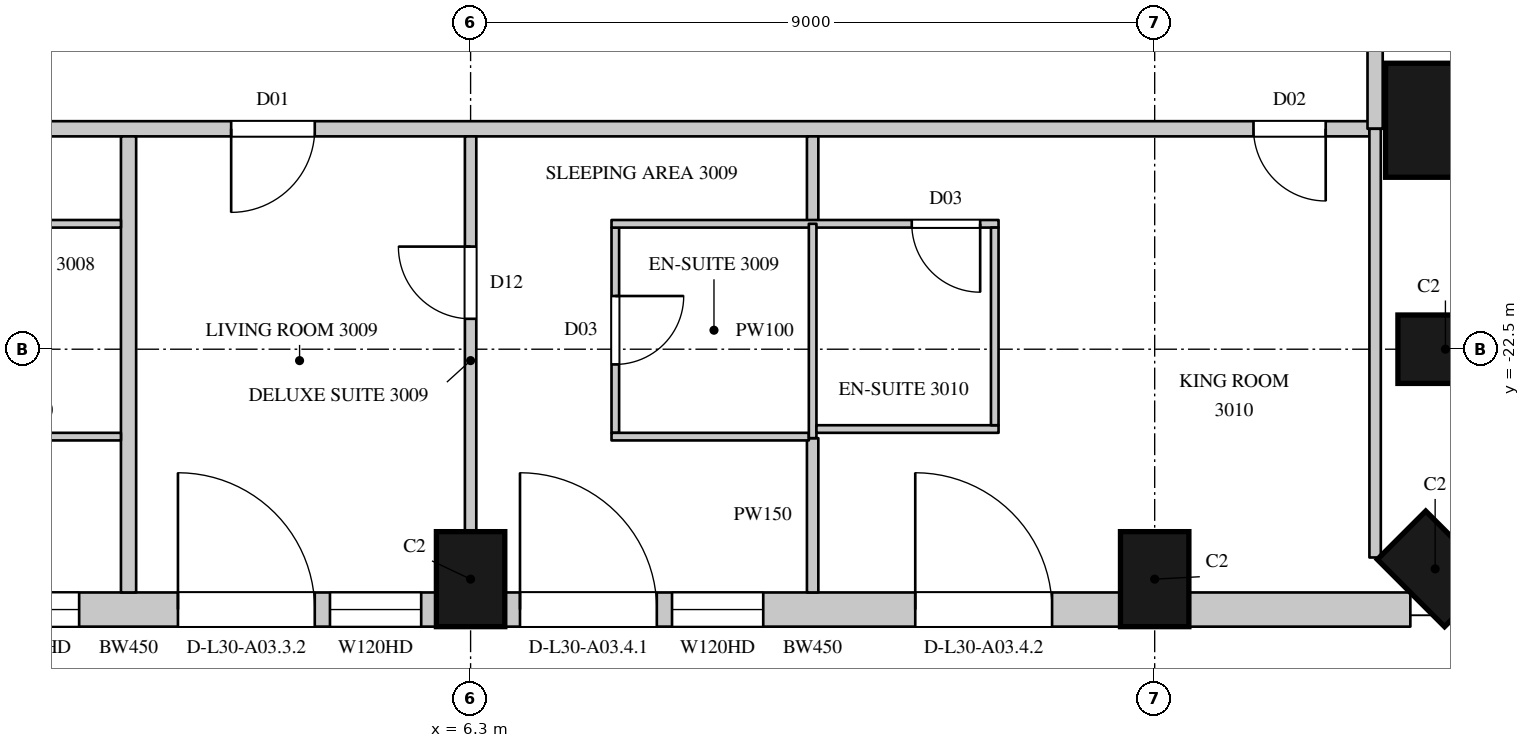
"""IFC4 building model, lengths in metres.
Left out: names, types, materials, properties, quantities, classifications, styles, units other than length and angle.
Written with IfcOpenShell. Run it as: python <this file> out.ifc"""

import sys

from ifc_helpers import new_model, si_unit, direction, frame, frame_2d, origin, origin_2d, place, context, subcontext, project, spatial, rectangle, circle, extrude, element, fill, save


model = new_model("IFC4")
c1 = context("Model", 3, precision=1e-05, world=origin(), true_north=direction((0.0, 1.0)))
c2 = subcontext(c1, "Body", "Model", "MODEL_VIEW")
j1 = project(units=[si_unit("LENGTHUNIT", "METRE"), si_unit("PLANEANGLEUNIT", "RADIAN")], contexts=[c1])
p1 = place(None, origin())
s1 = spatial("IfcSite", under=j1, at=p1, CompositionType="ELEMENT")
p2 = place(p1, origin())
s2 = spatial("IfcBuilding", under=s1, at=p2, CompositionType="ELEMENT")
p3 = place(p2, frame((0.0, 0.0, 138.3)))
s3 = spatial("IfcBuildingStorey", under=s2, at=p3, CompositionType="ELEMENT", Elevation=138.3)
for number, where, z_axis, x_axis in (
    (1, (6.3, -25.525, 0.0), (0.0, 0.0, 1.0), (1.0, 0.0, 0.0)),
    (2, (15.3, -25.525, 0.0), (0.0, 0.0, 1.0), (1.0, 0.0, 0.0)),
    (3, (18.99, -25.39, 0.0), (0.0, 0.0, 1.0), (0.707, 0.707, 0.0)),
    (4, (19.125, -22.5, 0.0), (0.0, 0.0, 1.0), (0.0, 1.0, 0.0)),
):
    element("IfcColumn", number, at=place(p3, frame(where, z_axis=z_axis, x_axis=x_axis)), inside=s3, PredefinedType="COLUMN", context=c2, shape_type="SweptSolid", body=[
        extrude(rectangle(XDim=0.9, YDim=1.25, at=origin_2d()), origin(), (0.0, 0.0, 1.0), 3.6),
    ])
p4 = place(p3, frame((19.088, -19.488, 0.0), z_axis=(0.0, 0.0, 1.0), x_axis=(1.0, 0.0, 0.0)))
e5 = element("IfcColumn", 5, at=p4, inside=s3, PredefinedType="COLUMN", context=c2, shape_type="SweptSolid", body=[
    extrude(circle(Radius=0.75, at=origin_2d()), origin(), (0.0, 0.0, 1.0), 3.6),
])
p5 = place(p3, frame((-2.25, -25.925, 0.0), z_axis=(0.0, 0.0, 1.0), x_axis=(1.0, 0.0, 0.0)))
e6 = element("IfcWall", 6, at=p5, inside=s3, PredefinedType="SOLIDWALL", context=c2, shape_type="SweptSolid", body=[
    extrude(rectangle(XDim=8.1, YDim=0.45, at=frame_2d((4.05, 0.0))), origin(), (0.0, 0.0, 1.0), 3.3),
])
p6 = place(p5, frame((0.2, 0.0, 0.0)))
e7 = element("IfcOpeningElement", 7, at=p6, cuts=e6, PredefinedType="OPENING", context=c2, shape_type="SweptSolid", body=[
    extrude(rectangle(XDim=1.8, YDim=2.4, at=frame_2d((0.9, 1.2))), frame((0.0, 0.235, 0.0), z_axis=(0.0, -1.0, 0.0), x_axis=(1.0, 0.0, 0.0)), (0.0, 0.0, 1.0), 0.47),
])
p7 = place(p5, frame((2.2, 0.0, 1.05)))
e8 = element("IfcOpeningElement", 8, at=p7, cuts=e6, PredefinedType="OPENING", context=c2, shape_type="SweptSolid", body=[
    extrude(rectangle(XDim=1.2, YDim=2.0, at=frame_2d((0.6, 1.0))), frame((0.0, 0.235, 0.0), z_axis=(0.0, -1.0, 0.0), x_axis=(1.0, 0.0, 0.0)), (0.0, 0.0, 1.0), 0.47),
])
p8 = place(p5, frame((4.7, 0.0, 0.0)))
e9 = element("IfcOpeningElement", 9, at=p8, cuts=e6, PredefinedType="OPENING", context=c2, shape_type="SweptSolid", body=[
    extrude(rectangle(XDim=1.8, YDim=2.4, at=frame_2d((0.9, 1.2))), frame((0.0, 0.235, 0.0), z_axis=(0.0, -1.0, 0.0), x_axis=(1.0, 0.0, 0.0)), (0.0, 0.0, 1.0), 0.47),
])
p9 = place(p5, frame((6.7, 0.0, 1.05)))
e10 = element("IfcOpeningElement", 10, at=p9, cuts=e6, PredefinedType="OPENING", context=c2, shape_type="SweptSolid", body=[
    extrude(rectangle(XDim=1.2, YDim=2.0, at=frame_2d((0.6, 1.0))), frame((0.0, 0.235, 0.0), z_axis=(0.0, -1.0, 0.0), x_axis=(1.0, 0.0, 0.0)), (0.0, 0.0, 1.0), 0.47),
])
p10 = place(p3, frame((6.75, -25.925, 0.0), z_axis=(0.0, 0.0, 1.0), x_axis=(1.0, 0.0, 0.0)))
e11 = element("IfcWall", 11, at=p10, inside=s3, PredefinedType="SOLIDWALL", context=c2, shape_type="SweptSolid", body=[
    extrude(rectangle(XDim=8.1, YDim=0.45, at=frame_2d((4.05, 0.0))), origin(), (0.0, 0.0, 1.0), 3.3),
])
p11 = place(p10, frame((0.2, 0.0, 0.0)))
e12 = element("IfcOpeningElement", 12, at=p11, cuts=e11, PredefinedType="OPENING", context=c2, shape_type="SweptSolid", body=[
    extrude(rectangle(XDim=1.8, YDim=2.4, at=frame_2d((0.9, 1.2))), frame((0.0, 0.235, 0.0), z_axis=(0.0, -1.0, 0.0), x_axis=(1.0, 0.0, 0.0)), (0.0, 0.0, 1.0), 0.47),
])
p12 = place(p10, frame((2.2, 0.0, 1.05)))
e13 = element("IfcOpeningElement", 13, at=p12, cuts=e11, PredefinedType="OPENING", context=c2, shape_type="SweptSolid", body=[
    extrude(rectangle(XDim=1.2, YDim=2.0, at=frame_2d((0.6, 1.0))), frame((0.0, 0.235, 0.0), z_axis=(0.0, -1.0, 0.0), x_axis=(1.0, 0.0, 0.0)), (0.0, 0.0, 1.0), 0.47),
])
p13 = place(p10, frame((5.4, 0.0, 0.0)))
e14 = element("IfcOpeningElement", 14, at=p13, cuts=e11, PredefinedType="OPENING", context=c2, shape_type="SweptSolid", body=[
    extrude(rectangle(XDim=1.8, YDim=2.4, at=frame_2d((0.9, 1.2))), frame((0.0, 0.235, 0.0), z_axis=(0.0, -1.0, 0.0), x_axis=(1.0, 0.0, 0.0)), (0.0, 0.0, 1.0), 0.47),
])
p14 = place(p3, frame((15.75, -25.925, 0.0), z_axis=(0.0, 0.0, 1.0), x_axis=(1.0, 0.0, 0.0)))
e15 = element("IfcWall", 15, at=p14, inside=s3, PredefinedType="SOLIDWALL", context=c2, shape_type="SweptSolid", body=[
    extrude(rectangle(XDim=2.914, YDim=0.45, at=frame_2d((1.457, 0.0))), origin(), (0.0, 0.0, 1.0), 3.3),
])
p15 = place(p3, frame((-20.7, -19.6, 0.0), z_axis=(0.0, 0.0, 1.0), x_axis=(1.0, 0.0, 0.0)))
e16 = element("IfcWall", 16, at=p15, inside=s3, PredefinedType="PARTITIONING", context=c2, shape_type="SweptSolid", body=[
    extrude(rectangle(XDim=38.825, YDim=0.2, at=frame_2d((19.413, 0.0))), origin(), (0.0, 0.0, 1.0), 3.3),
])
p16 = place(p15, frame((3.15, 0.0, 0.0)))
e17 = element("IfcOpeningElement", 17, at=p16, cuts=e16, PredefinedType="OPENING", context=c2, shape_type="SweptSolid", body=[
    extrude(rectangle(XDim=1.1, YDim=2.4, at=frame_2d((0.55, 1.2))), frame((0.0, 0.11, 0.0), z_axis=(0.0, -1.0, 0.0), x_axis=(1.0, 0.0, 0.0)), (0.0, 0.0, 1.0), 0.22),
])
p17 = place(p15, frame((14.85, 0.0, 0.0)))
e18 = element("IfcOpeningElement", 18, at=p17, cuts=e16, PredefinedType="OPENING", context=c2, shape_type="SweptSolid", body=[
    extrude(rectangle(XDim=1.1, YDim=2.4, at=frame_2d((0.55, 1.2))), frame((0.0, 0.11, 0.0), z_axis=(0.0, -1.0, 0.0), x_axis=(1.0, 0.0, 0.0)), (0.0, 0.0, 1.0), 0.22),
])
p18 = place(p15, frame((23.85, 0.0, 0.0)))
e19 = element("IfcOpeningElement", 19, at=p18, cuts=e16, PredefinedType="OPENING", context=c2, shape_type="SweptSolid", body=[
    extrude(rectangle(XDim=1.1, YDim=2.4, at=frame_2d((0.55, 1.2))), frame((0.0, 0.11, 0.0), z_axis=(0.0, -1.0, 0.0), x_axis=(1.0, 0.0, 0.0)), (0.0, 0.0, 1.0), 0.22),
])
p19 = place(p15, frame((37.3, 0.0, 0.0)))
e20 = element("IfcOpeningElement", 20, at=p19, cuts=e16, PredefinedType="OPENING", context=c2, shape_type="SweptSolid", body=[
    extrude(rectangle(XDim=0.95, YDim=2.2, at=frame_2d((0.475, 1.1))), frame((0.0, 0.11, 0.0), z_axis=(0.0, -1.0, 0.0), x_axis=(1.0, 0.0, 0.0)), (0.0, 0.0, 1.0), 0.22),
])
p20 = place(p3, frame((18.2, -19.6, 0.0), z_axis=(0.0, 0.0, 1.0), x_axis=(0.0, 1.0, 0.0)))
e21 = element("IfcWall", 21, at=p20, inside=s3, PredefinedType="PARTITIONING", context=c2, shape_type="SweptSolid", body=[
    extrude(rectangle(XDim=14.85, YDim=0.2, at=frame_2d((7.425, 0.0))), origin(), (0.0, 0.0, 1.0), 3.3),
])
p21 = place(p20, frame((3.9, 0.0, 0.0)))
e22 = element("IfcOpeningElement", 22, at=p21, cuts=e21, PredefinedType="OPENING", context=c2, shape_type="SweptSolid", body=[
    extrude(rectangle(XDim=0.95, YDim=2.2, at=frame_2d((0.475, 1.1))), frame((0.0, 0.11, 0.0), z_axis=(0.0, -1.0, 0.0), x_axis=(1.0, 0.0, 0.0)), (0.0, 0.0, 1.0), 0.22),
])
p22 = place(p20, frame((13.5, 0.0, 0.0)))
e23 = element("IfcOpeningElement", 23, at=p22, cuts=e21, PredefinedType="OPENING", context=c2, shape_type="SweptSolid", body=[
    extrude(rectangle(XDim=0.95, YDim=2.2, at=frame_2d((0.475, 1.1))), frame((0.0, 0.11, 0.0), z_axis=(0.0, -1.0, 0.0), x_axis=(1.0, 0.0, 0.0)), (0.0, 0.0, 1.0), 0.22),
])
p23 = place(p3, frame((6.3, -24.9, 0.0), z_axis=(0.0, 0.0, 1.0), x_axis=(0.0, 1.0, 0.0)))
e24 = element("IfcWall", 24, at=p23, inside=s3, PredefinedType="PARTITIONING", context=c2, shape_type="SweptSolid", body=[
    extrude(rectangle(XDim=5.2, YDim=0.15, at=frame_2d((2.6, 0.0))), origin(), (0.0, 0.0, 1.0), 2.75),
])
p24 = place(p23, frame((2.8, 0.0, 0.0)))
e25 = element("IfcOpeningElement", 25, at=p24, cuts=e24, PredefinedType="OPENING", context=c2, shape_type="SweptSolid", body=[
    extrude(rectangle(XDim=0.95, YDim=2.2, at=frame_2d((0.475, 1.1))), frame((0.0, 0.085, 0.0), z_axis=(0.0, -1.0, 0.0), x_axis=(1.0, 0.0, 0.0)), (0.0, 0.0, 1.0), 0.17),
])
p25 = place(p3, frame((10.8, -25.7, 0.0), z_axis=(0.0, 0.0, 1.0), x_axis=(0.0, 1.0, 0.0)))
e26 = element("IfcWall", 26, at=p25, inside=s3, PredefinedType="PARTITIONING", context=c2, shape_type="SweptSolid", body=[
    extrude(rectangle(XDim=2.03, YDim=0.15, at=frame_2d((1.015, 0.0))), origin(), (0.0, 0.0, 1.0), 2.65),
])
p26 = place(p3, frame((10.8, -20.85, 0.0), z_axis=(0.0, 0.0, 1.0), x_axis=(0.0, 1.0, 0.0)))
e27 = element("IfcWall", 27, at=p26, inside=s3, PredefinedType="PARTITIONING", context=c2, shape_type="SweptSolid", body=[
    extrude(rectangle(XDim=1.15, YDim=0.15, at=frame_2d((0.575, 0.0))), origin(), (0.0, 0.0, 1.0), 2.65),
])
p27 = place(p3, frame((18.2, -25.24, 0.0), z_axis=(0.0, 0.0, 1.0), x_axis=(0.0, 1.0, 0.0)))
e28 = element("IfcWall", 28, at=p27, inside=s3, PredefinedType="PARTITIONING", context=c2, shape_type="SweptSolid", body=[
    extrude(rectangle(XDim=5.64, YDim=0.15, at=frame_2d((2.82, 0.0))), origin(), (0.0, 0.0, 1.0), 3.3),
])
p28 = place(p3, frame((1.8, -25.7, 0.0), z_axis=(0.0, 0.0, 1.0), x_axis=(0.0, 1.0, 0.0)))
e29 = element("IfcWall", 29, at=p28, inside=s3, PredefinedType="PARTITIONING", context=c2, shape_type="SweptSolid", body=[
    extrude(rectangle(XDim=6.0, YDim=0.2, at=frame_2d((3.0, 0.0))), origin(), (0.0, 0.0, 1.0), 2.65),
])
for number, where, z_axis, x_axis in (
    (30, (-0.846, -23.65, 0.0), (0.0, 0.0, 1.0), (1.0, 0.0, 0.0)),
    (31, (-0.846, -20.85, 0.0), (0.0, 0.0, 1.0), (1.0, 0.0, 0.0)),
):
    element("IfcWall", number, at=place(p3, frame(where, z_axis=z_axis, x_axis=x_axis)), inside=s3, PredefinedType="PARTITIONING", context=c2, shape_type="SweptSolid", body=[
        extrude(rectangle(XDim=2.546, YDim=0.1, at=frame_2d((1.273, 0.0))), origin(), (0.0, 0.0, 1.0), 3.3),
    ])
p29 = place(p3, frame((8.204, -23.6, 0.0), z_axis=(0.0, 0.0, 1.0), x_axis=(0.0, 1.0, 0.0)))
e32 = element("IfcWall", 32, at=p29, inside=s3, PredefinedType="PARTITIONING", context=c2, shape_type="SweptSolid", body=[
    extrude(rectangle(XDim=2.7, YDim=0.1, at=frame_2d((1.35, 0.0))), origin(), (0.0, 0.0, 1.0), 3.3),
])
p30 = place(p29, frame((0.9, 0.0, 0.0)))
e33 = element("IfcOpeningElement", 33, at=p30, cuts=e32, PredefinedType="OPENING", context=c2, shape_type="SweptSolid", body=[
    extrude(rectangle(XDim=0.9, YDim=2.2, at=frame_2d((0.45, 1.1))), frame((0.0, 0.06, 0.0), z_axis=(0.0, -1.0, 0.0), x_axis=(1.0, 0.0, 0.0)), (0.0, 0.0, 1.0), 0.12),
])
p31 = place(p3, frame((8.154, -23.65, 0.0), z_axis=(0.0, 0.0, 1.0), x_axis=(1.0, 0.0, 0.0)))
e34 = element("IfcWall", 34, at=p31, inside=s3, PredefinedType="PARTITIONING", context=c2, shape_type="SweptSolid", body=[
    extrude(rectangle(XDim=2.596, YDim=0.1, at=frame_2d((1.298, 0.0))), origin(), (0.0, 0.0, 1.0), 3.3),
])
p32 = place(p3, frame((8.154, -20.85, 0.0), z_axis=(0.0, 0.0, 1.0), x_axis=(1.0, 0.0, 0.0)))
e35 = element("IfcWall", 35, at=p32, inside=s3, PredefinedType="PARTITIONING", context=c2, shape_type="SweptSolid", body=[
    extrude(rectangle(XDim=5.092, YDim=0.1, at=frame_2d((2.546, 0.0))), origin(), (0.0, 0.0, 1.0), 3.3),
])
p33 = place(p32, frame((3.95, 0.0, 0.0)))
e36 = element("IfcOpeningElement", 36, at=p33, cuts=e35, PredefinedType="OPENING", context=c2, shape_type="SweptSolid", body=[
    extrude(rectangle(XDim=0.9, YDim=2.2, at=frame_2d((0.45, 1.1))), frame((0.0, 0.06, 0.0), z_axis=(0.0, -1.0, 0.0), x_axis=(1.0, 0.0, 0.0)), (0.0, 0.0, 1.0), 0.12),
])
p34 = place(p3, frame((10.8, -23.67, 0.0), z_axis=(0.0, 0.0, 1.0), x_axis=(0.0, 1.0, 0.0)))
e37 = element("IfcWall", 37, at=p34, inside=s3, PredefinedType="PARTITIONING", context=c2, shape_type="SweptSolid", body=[
    extrude(rectangle(XDim=2.82, YDim=0.1, at=frame_2d((1.41, 0.0))), origin(), (0.0, 0.0, 1.0), 2.65),
])
p35 = place(p3, frame((10.85, -23.55, 0.0), z_axis=(0.0, 0.0, 1.0), x_axis=(1.0, 0.0, 0.0)))
e38 = element("IfcWall", 38, at=p35, inside=s3, PredefinedType="PARTITIONING", context=c2, shape_type="SweptSolid", body=[
    extrude(rectangle(XDim=2.396, YDim=0.1, at=frame_2d((1.198, 0.0))), origin(), (0.0, 0.0, 1.0), 3.3),
])
p36 = place(p3, frame((13.196, -23.5, 0.0), z_axis=(0.0, 0.0, 1.0), x_axis=(0.0, 1.0, 0.0)))
e39 = element("IfcWall", 39, at=p36, inside=s3, PredefinedType="PARTITIONING", context=c2, shape_type="SweptSolid", body=[
    extrude(rectangle(XDim=2.6, YDim=0.1, at=frame_2d((1.3, 0.0))), origin(), (0.0, 0.0, 1.0), 3.3),
])
p37 = place(p7, origin())
e40 = element("IfcWindow", 40, at=p37, inside=s3, PartitioningType="SINGLE_PANEL", PredefinedType="WINDOW", context=c2, shape_type="SweptSolid", body=[
    extrude(rectangle(XDim=1.2, YDim=2.0, at=frame_2d((0.6, 1.0))), frame((0.0, 0.135, 0.0), z_axis=(0.0, -1.0, 0.0), x_axis=(1.0, 0.0, 0.0)), (0.0, 0.0, 1.0), 0.06),
])
fill(e8, e40)
p38 = place(p8, origin())
e41 = element("IfcDoor", 41, at=p38, inside=s3, OperationType="SLIDING_TO_LEFT", PredefinedType="DOOR", context=c2, shape_type="SweptSolid", body=[
    extrude(rectangle(XDim=1.8, YDim=2.4, at=frame_2d((0.9, 1.2))), frame((0.0, 0.13, 0.0), z_axis=(0.0, -1.0, 0.0), x_axis=(1.0, 0.0, 0.0)), (0.0, 0.0, 1.0), 0.05),
])
fill(e9, e41)
p39 = place(p9, origin())
e42 = element("IfcWindow", 42, at=p39, inside=s3, PartitioningType="SINGLE_PANEL", PredefinedType="WINDOW", context=c2, shape_type="SweptSolid", body=[
    extrude(rectangle(XDim=1.2, YDim=2.0, at=frame_2d((0.6, 1.0))), frame((0.0, 0.135, 0.0), z_axis=(0.0, -1.0, 0.0), x_axis=(1.0, 0.0, 0.0)), (0.0, 0.0, 1.0), 0.06),
])
fill(e10, e42)
p40 = place(p11, origin())
e43 = element("IfcDoor", 43, at=p40, inside=s3, OperationType="SLIDING_TO_LEFT", PredefinedType="DOOR", context=c2, shape_type="SweptSolid", body=[
    extrude(rectangle(XDim=1.8, YDim=2.4, at=frame_2d((0.9, 1.2))), frame((0.0, 0.13, 0.0), z_axis=(0.0, -1.0, 0.0), x_axis=(1.0, 0.0, 0.0)), (0.0, 0.0, 1.0), 0.05),
])
fill(e12, e43)
p41 = place(p12, origin())
e44 = element("IfcWindow", 44, at=p41, inside=s3, PartitioningType="SINGLE_PANEL", PredefinedType="WINDOW", context=c2, shape_type="SweptSolid", body=[
    extrude(rectangle(XDim=1.2, YDim=2.0, at=frame_2d((0.6, 1.0))), frame((0.0, 0.135, 0.0), z_axis=(0.0, -1.0, 0.0), x_axis=(1.0, 0.0, 0.0)), (0.0, 0.0, 1.0), 0.06),
])
fill(e13, e44)
p42 = place(p13, origin())
e45 = element("IfcDoor", 45, at=p42, inside=s3, OperationType="SLIDING_TO_LEFT", PredefinedType="DOOR", context=c2, shape_type="SweptSolid", body=[
    extrude(rectangle(XDim=1.8, YDim=2.4, at=frame_2d((0.9, 1.2))), frame((0.0, 0.13, 0.0), z_axis=(0.0, -1.0, 0.0), x_axis=(1.0, 0.0, 0.0)), (0.0, 0.0, 1.0), 0.05),
])
fill(e14, e45)
p43 = place(p18, origin())
e46 = element("IfcDoor", 46, at=p43, inside=s3, OperationType="SINGLE_SWING_RIGHT", PredefinedType="DOOR", context=c2, shape_type="SweptSolid", body=[
    extrude(rectangle(XDim=1.1, YDim=2.4, at=frame_2d((0.55, 1.2))), frame((0.0, 0.025, 0.0), z_axis=(0.0, -1.0, 0.0), x_axis=(1.0, 0.0, 0.0)), (0.0, 0.0, 1.0), 0.05),
])
fill(e19, e46)
p44 = place(p24, origin())
e47 = element("IfcDoor", 47, at=p44, inside=s3, OperationType="SINGLE_SWING_RIGHT", PredefinedType="DOOR", context=c2, shape_type="SweptSolid", body=[
    extrude(rectangle(XDim=0.95, YDim=2.2, at=frame_2d((0.475, 1.1))), frame((0.0, 0.025, 0.0), z_axis=(0.0, -1.0, 0.0), x_axis=(1.0, 0.0, 0.0)), (0.0, 0.0, 1.0), 0.05),
])
fill(e25, e47)
p45 = place(p30, origin())
e48 = element("IfcDoor", 48, at=p45, inside=s3, OperationType="SINGLE_SWING_LEFT", PredefinedType="DOOR", context=c2, shape_type="SweptSolid", body=[
    extrude(rectangle(XDim=0.9, YDim=2.2, at=frame_2d((0.45, 1.1))), frame((0.0, 0.025, 0.0), z_axis=(0.0, -1.0, 0.0), x_axis=(1.0, 0.0, 0.0)), (0.0, 0.0, 1.0), 0.05),
])
fill(e33, e48)
p46 = place(p19, origin())
e49 = element("IfcDoor", 49, at=p46, inside=s3, OperationType="SINGLE_SWING_LEFT", PredefinedType="DOOR", context=c2, shape_type="SweptSolid", body=[
    extrude(rectangle(XDim=0.95, YDim=2.2, at=frame_2d((0.475, 1.1))), frame((0.0, 0.025, 0.0), z_axis=(0.0, -1.0, 0.0), x_axis=(1.0, 0.0, 0.0)), (0.0, 0.0, 1.0), 0.05),
])
fill(e20, e49)
p47 = place(p33, origin())
e50 = element("IfcDoor", 50, at=p47, inside=s3, OperationType="SINGLE_SWING_LEFT", PredefinedType="DOOR", context=c2, shape_type="SweptSolid", body=[
    extrude(rectangle(XDim=0.9, YDim=2.2, at=frame_2d((0.45, 1.1))), frame((0.0, 0.025, 0.0), z_axis=(0.0, -1.0, 0.0), x_axis=(1.0, 0.0, 0.0)), (0.0, 0.0, 1.0), 0.05),
])
fill(e36, e50)
save(model, sys.argv[1])
